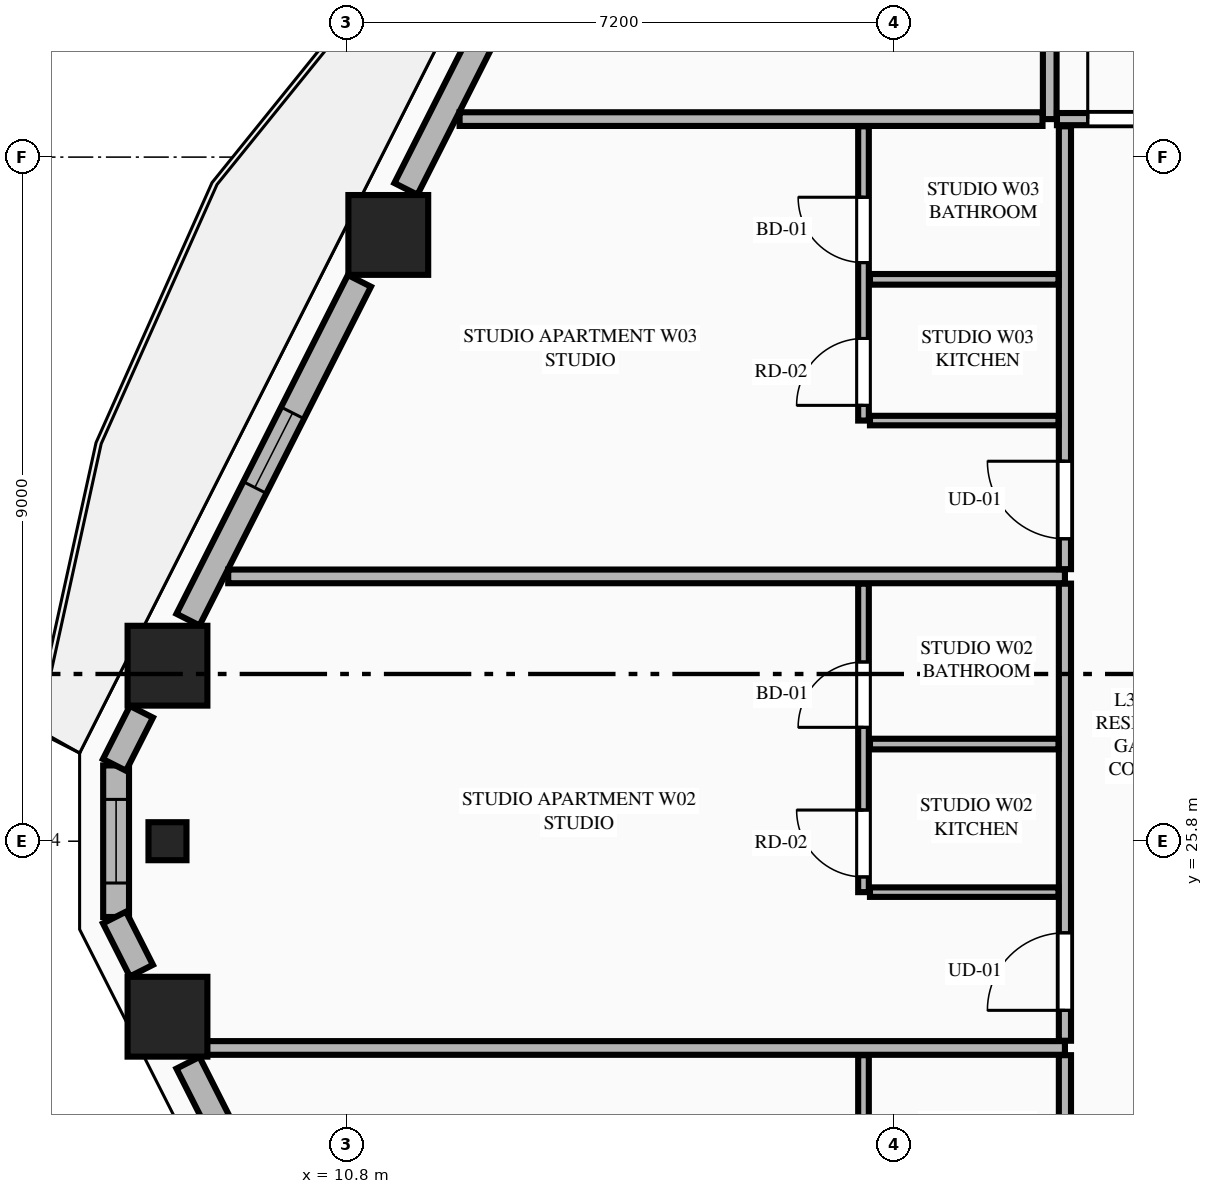
"""IFC4 building model, lengths in metres.
Left out: names, types, materials, properties, quantities, classifications, styles, units other than length and angle.
Written with IfcOpenShell. Run it as: python <this file> out.ifc"""

import sys

from ifc_helpers import new_model, si_unit, direction, frame, frame_2d, origin, origin_2d, place, context, subcontext, project, spatial, rectangle, extrude, element, fill, save


model = new_model("IFC4")
c1 = context("Model", 3, precision=1e-05, world=origin(), true_north=direction((0.0, 1.0)))
c2 = subcontext(c1, "Body", "Model", "MODEL_VIEW")
j1 = project(units=[si_unit("LENGTHUNIT", "METRE"), si_unit("PLANEANGLEUNIT", "RADIAN")], contexts=[c1])
p1 = place(None, origin())
s1 = spatial("IfcSite", under=j1, at=p1, CompositionType="ELEMENT")
p2 = place(p1, origin())
s2 = spatial("IfcBuilding", under=s1, at=p2, CompositionType="ELEMENT")
p3 = place(p2, frame((0.0, 0.0, 116.15)))
s3 = spatial("IfcBuildingStorey", under=s2, at=p3, CompositionType="ELEMENT", Elevation=116.15)
for number, where, z_axis, x_axis in (
    (1, (11.348, 33.776, 0.0), (0.0, 0.0, 1.0), (1.0, 0.0, 0.0)),
    (2, (8.443, 28.109, 0.0), (0.0, 0.0, 1.0), (1.0, 0.0, 0.0)),
    (3, (8.443, 23.491, 0.0), (0.0, 0.0, 1.0), (1.0, 0.0, 0.0)),
):
    element("IfcColumn", number, at=place(p3, frame(where, z_axis=z_axis, x_axis=x_axis)), inside=s3, PredefinedType="COLUMN", context=c2, shape_type="SweptSolid", body=[
        extrude(rectangle(XDim=1.05, YDim=1.05, at=origin_2d()), origin(), (0.0, 0.0, 1.0), 3.55),
    ])
p4 = place(p3, frame((8.443, 25.8, 0.0), z_axis=(0.0, 0.0, 1.0), x_axis=(0.0, -1.0, 0.0)))
e4 = element("IfcColumn", 4, at=p4, inside=s3, PredefinedType="PILASTER", context=c2, shape_type="SweptSolid", body=[
    extrude(rectangle(XDim=0.5, YDim=0.35, at=origin_2d()), origin(), (0.0, 0.0, 1.0), 3.55),
])
p5 = place(p3, frame((7.767, 26.797, 0.0), z_axis=(0.0, 0.0, 1.0), x_axis=(0.0, -1.0, 0.0)))
e5 = element("IfcWall", 5, at=p5, inside=s3, PredefinedType="STANDARD", context=c2, shape_type="SweptSolid", body=[
    extrude(rectangle(XDim=1.994, YDim=0.34, at=frame_2d((0.997, 0.0))), origin(), (0.0, 0.0, 1.0), 3.34),
])
p6 = place(p5, frame((0.447, 0.0, 0.75)))
e6 = element("IfcOpeningElement", 6, at=p6, cuts=e5, PredefinedType="OPENING", context=c2, shape_type="SweptSolid", body=[
    extrude(rectangle(XDim=1.1, YDim=2.0, at=frame_2d((0.55, 1.0))), frame((0.0, 0.18, 0.0), z_axis=(0.0, -1.0, 0.0), x_axis=(1.0, 0.0, 0.0)), (0.0, 0.0, 1.0), 0.36),
])
p7 = place(p3, frame((13.937, 39.039, 0.0), z_axis=(0.0, 0.0, 1.0), x_axis=(-0.451567731634, -0.892236842855, 0.0)))
e7 = element("IfcWall", 7, at=p7, inside=s3, PredefinedType="STANDARD", context=c2, shape_type="SweptSolid", body=[
    extrude(rectangle(XDim=5.219, YDim=0.34, at=frame_2d((2.61, 0.0))), origin(), (0.0, 0.0, 1.0), 2.797),
])
p8 = place(p7, frame((1.42, 0.0, 0.0)))
e8 = element("IfcOpeningElement", 8, at=p8, cuts=e7, PredefinedType="OPENING", context=c2, shape_type="SweptSolid", body=[
    extrude(rectangle(XDim=1.1, YDim=2.25, at=frame_2d((0.55, 1.125))), frame((0.0, 0.18, 0.0), z_axis=(0.0, -1.0, 0.0), x_axis=(1.0, 0.0, 0.0)), (0.0, 0.0, 1.0), 0.36),
])
p9 = place(p3, frame((10.968, 33.172, 0.0), z_axis=(0.0, 0.0, 1.0), x_axis=(-0.451470533039, -0.892286029139, 0.0)))
e9 = element("IfcWall", 9, at=p9, inside=s3, PredefinedType="STANDARD", context=c2, shape_type="SweptSolid", body=[
    extrude(rectangle(XDim=4.995, YDim=0.34, at=frame_2d((2.498, 0.0))), origin(), (0.0, 0.0, 1.0), 2.797),
])
p10 = place(p9, frame((1.947, 0.0, 0.75)))
e10 = element("IfcOpeningElement", 10, at=p10, cuts=e9, PredefinedType="OPENING", context=c2, shape_type="SweptSolid", body=[
    extrude(rectangle(XDim=1.1, YDim=1.897, at=frame_2d((0.55, 0.948))), frame((0.0, 0.18, 0.0), z_axis=(0.0, -1.0, 0.0), x_axis=(1.0, 0.0, 0.0)), (0.0, 0.0, 1.0), 0.36),
])
for number, where, z_axis, x_axis in (
    (11, (8.1, 27.503, 0.0), (0.0, 0.0, 1.0), (-0.452, -0.892, 0.0)),
    (12, (7.746, 24.796, 0.0), (0.0, 0.0, 1.0), (0.452, -0.892, 0.0)),
):
    element("IfcWall", number, at=place(p3, frame(where, z_axis=z_axis, x_axis=x_axis)), inside=s3, PredefinedType="STANDARD", context=c2, shape_type="SweptSolid", body=[
        extrude(rectangle(XDim=0.783, YDim=0.34, at=frame_2d((0.392, 0.0))), origin(), (0.0, 0.0, 1.0), 3.34),
    ])
p11 = place(p3, frame((8.713, 22.885, 0.0), z_axis=(0.0, 0.0, 1.0), x_axis=(0.451470533039, -0.892286029139, 0.0)))
e13 = element("IfcWall", 13, at=p11, inside=s3, PredefinedType="STANDARD", context=c2, shape_type="SweptSolid", body=[
    extrude(rectangle(XDim=4.995, YDim=0.34, at=frame_2d((2.498, 0.0))), origin(), (0.0, 0.0, 1.0), 2.797),
])
p12 = place(p11, frame((1.947, 0.0, 0.75)))
e14 = element("IfcOpeningElement", 14, at=p12, cuts=e13, PredefinedType="OPENING", context=c2, shape_type="SweptSolid", body=[
    extrude(rectangle(XDim=1.1, YDim=1.897, at=frame_2d((0.55, 0.948))), frame((0.0, 0.18, 0.0), z_axis=(0.0, -1.0, 0.0), x_axis=(1.0, 0.0, 0.0)), (0.0, 0.0, 1.0), 0.36),
])
p13 = place(p3, frame((20.05, 35.3, 0.0), z_axis=(0.0, 0.0, 1.0), x_axis=(0.0, 1.0, 0.0)))
e15 = element("IfcWall", 15, at=p13, inside=s3, PredefinedType="PARTITIONING", context=c2, shape_type="SweptSolid", body=[
    extrude(rectangle(XDim=12.195, YDim=0.18, at=frame_2d((6.098, 0.0))), origin(), (0.0, 0.0, 1.0), 3.34),
])
p14 = place(p3, frame((20.145, 35.3, 0.0), z_axis=(0.0, 0.0, 1.0), x_axis=(1.0, 0.0, 0.0)))
e16 = element("IfcWall", 16, at=p14, inside=s3, PredefinedType="PARTITIONING", context=c2, shape_type="SweptSolid", body=[
    extrude(rectangle(XDim=24.51, YDim=0.16, at=frame_2d((12.255, 0.0))), origin(), (0.0, 0.0, 1.0), 3.34),
])
p15 = place(p14, frame((0.405, 0.0, 0.0)))
e17 = element("IfcOpeningElement", 17, at=p15, cuts=e16, PredefinedType="OPENING", context=c2, shape_type="SweptSolid", body=[
    extrude(rectangle(XDim=1.35, YDim=2.35, at=frame_2d((0.675, 1.175))), frame((0.0, 0.09, 0.0), z_axis=(0.0, -1.0, 0.0), x_axis=(1.0, 0.0, 0.0)), (0.0, 0.0, 1.0), 0.18),
])
p16 = place(p3, frame((12.286, 35.3, 0.0), z_axis=(0.0, 0.0, 1.0), x_axis=(1.0, 0.0, 0.0)))
e18 = element("IfcWall", 18, at=p16, inside=s3, PredefinedType="PARTITIONING", context=c2, shape_type="SweptSolid", body=[
    extrude(rectangle(XDim=7.669, YDim=0.18, at=frame_2d((3.834, 0.0))), origin(), (0.0, 0.0, 1.0), 3.34),
])
p17 = place(p3, frame((20.25, 16.595, 0.0), z_axis=(0.0, 0.0, 1.0), x_axis=(0.0, 1.0, 0.0)))
e19 = element("IfcWall", 19, at=p17, inside=s3, PredefinedType="PARTITIONING", context=c2, shape_type="SweptSolid", body=[
    extrude(rectangle(XDim=6.39, YDim=0.16, at=frame_2d((3.195, 0.0))), origin(), (0.0, 0.0, 1.0), 3.34),
])
p18 = place(p17, frame((0.4, 0.0, 0.0)))
e20 = element("IfcOpeningElement", 20, at=p18, cuts=e19, PredefinedType="OPENING", context=c2, shape_type="SweptSolid", body=[
    extrude(rectangle(XDim=1.02, YDim=2.25, at=frame_2d((0.51, 1.125))), frame((0.0, 0.09, 0.0), z_axis=(0.0, -1.0, 0.0), x_axis=(1.0, 0.0, 0.0)), (0.0, 0.0, 1.0), 0.18),
])
p19 = place(p3, frame((17.6, 18.55, 0.0), z_axis=(0.0, 0.0, 1.0), x_axis=(0.0, 1.0, 0.0)))
e21 = element("IfcWall", 21, at=p19, inside=s3, PredefinedType="PLUMBINGWALL", context=c2, shape_type="SweptSolid", body=[
    extrude(rectangle(XDim=4.435, YDim=0.14, at=frame_2d((2.218, 0.0))), origin(), (0.0, 0.0, 1.0), 3.34),
])
p20 = place(p19, frame((2.349, 0.0, 0.0)))
e22 = element("IfcOpeningElement", 22, at=p20, cuts=e21, PredefinedType="OPENING", context=c2, shape_type="SweptSolid", body=[
    extrude(rectangle(XDim=0.86, YDim=2.1, at=frame_2d((0.43, 1.05))), frame((0.0, 0.08, 0.0), z_axis=(0.0, -1.0, 0.0), x_axis=(1.0, 0.0, 0.0)), (0.0, 0.0, 1.0), 0.16),
])
p21 = place(p19, frame((0.2, 0.0, 0.0)))
e23 = element("IfcOpeningElement", 23, at=p21, cuts=e21, PredefinedType="OPENING", context=c2, shape_type="SweptSolid", body=[
    extrude(rectangle(XDim=0.88, YDim=2.15, at=frame_2d((0.44, 1.075))), frame((0.0, 0.08, 0.0), z_axis=(0.0, -1.0, 0.0), x_axis=(1.0, 0.0, 0.0)), (0.0, 0.0, 1.0), 0.16),
])
p22 = place(p3, frame((8.856, 23.08, 0.0), z_axis=(0.0, 0.0, 1.0), x_axis=(1.0, 0.0, 0.0)))
e24 = element("IfcWall", 24, at=p22, inside=s3, PredefinedType="PARTITIONING", context=c2, shape_type="SweptSolid", body=[
    extrude(rectangle(XDim=11.394, YDim=0.18, at=frame_2d((5.697, 0.0))), origin(), (0.0, 0.0, 1.0), 3.34),
])
p23 = place(p3, frame((20.25, 23.175, 0.0), z_axis=(0.0, 0.0, 1.0), x_axis=(0.0, 1.0, 0.0)))
e25 = element("IfcWall", 25, at=p23, inside=s3, PredefinedType="PARTITIONING", context=c2, shape_type="SweptSolid", body=[
    extrude(rectangle(XDim=6.014, YDim=0.16, at=frame_2d((3.007, 0.0))), origin(), (0.0, 0.0, 1.0), 3.34),
])
p24 = place(p23, frame((0.4, 0.0, 0.0)))
e26 = element("IfcOpeningElement", 26, at=p24, cuts=e25, PredefinedType="OPENING", context=c2, shape_type="SweptSolid", body=[
    extrude(rectangle(XDim=1.02, YDim=2.25, at=frame_2d((0.51, 1.125))), frame((0.0, 0.09, 0.0), z_axis=(0.0, -1.0, 0.0), x_axis=(1.0, 0.0, 0.0)), (0.0, 0.0, 1.0), 0.18),
])
p25 = place(p3, frame((17.685, 25.13, 0.0), z_axis=(0.0, 0.0, 1.0), x_axis=(1.0, 0.0, 0.0)))
e27 = element("IfcWall", 27, at=p25, inside=s3, PredefinedType="PARTITIONING", context=c2, shape_type="SweptSolid", body=[
    extrude(rectangle(XDim=2.48, YDim=0.125, at=frame_2d((1.24, 0.0))), origin(), (0.0, 0.0, 1.0), 3.34),
])
p26 = place(p3, frame((17.6, 25.13, 0.0), z_axis=(0.0, 0.0, 1.0), x_axis=(0.0, 1.0, 0.0)))
e28 = element("IfcWall", 28, at=p26, inside=s3, PredefinedType="PLUMBINGWALL", context=c2, shape_type="SweptSolid", body=[
    extrude(rectangle(XDim=4.059, YDim=0.14, at=frame_2d((2.03, 0.0))), origin(), (0.0, 0.0, 1.0), 3.34),
])
p27 = place(p26, frame((2.168, 0.0, 0.0)))
e29 = element("IfcOpeningElement", 29, at=p27, cuts=e28, PredefinedType="OPENING", context=c2, shape_type="SweptSolid", body=[
    extrude(rectangle(XDim=0.86, YDim=2.1, at=frame_2d((0.43, 1.05))), frame((0.0, 0.08, 0.0), z_axis=(0.0, -1.0, 0.0), x_axis=(1.0, 0.0, 0.0)), (0.0, 0.0, 1.0), 0.16),
])
p28 = place(p26, frame((0.2, 0.0, 0.0)))
e30 = element("IfcOpeningElement", 30, at=p28, cuts=e28, PredefinedType="OPENING", context=c2, shape_type="SweptSolid", body=[
    extrude(rectangle(XDim=0.88, YDim=2.15, at=frame_2d((0.44, 1.075))), frame((0.0, 0.08, 0.0), z_axis=(0.0, -1.0, 0.0), x_axis=(1.0, 0.0, 0.0)), (0.0, 0.0, 1.0), 0.16),
])
p29 = place(p3, frame((17.685, 27.078, 0.0), z_axis=(0.0, 0.0, 1.0), x_axis=(1.0, 0.0, 0.0)))
e31 = element("IfcWall", 31, at=p29, inside=s3, PredefinedType="PLUMBINGWALL", context=c2, shape_type="SweptSolid", body=[
    extrude(rectangle(XDim=2.48, YDim=0.14, at=frame_2d((1.24, 0.0))), origin(), (0.0, 0.0, 1.0), 3.34),
])
p30 = place(p3, frame((9.242, 29.284, 0.0), z_axis=(0.0, 0.0, 1.0), x_axis=(1.0, 0.0, 0.0)))
e32 = element("IfcWall", 32, at=p30, inside=s3, PredefinedType="PARTITIONING", context=c2, shape_type="SweptSolid", body=[
    extrude(rectangle(XDim=11.008, YDim=0.18, at=frame_2d((5.504, 0.0))), origin(), (0.0, 0.0, 1.0), 3.34),
])
p31 = place(p3, frame((20.25, 29.379, 0.0), z_axis=(0.0, 0.0, 1.0), x_axis=(0.0, 1.0, 0.0)))
e33 = element("IfcWall", 33, at=p31, inside=s3, PredefinedType="PARTITIONING", context=c2, shape_type="SweptSolid", body=[
    extrude(rectangle(XDim=5.826, YDim=0.16, at=frame_2d((2.913, 0.0))), origin(), (0.0, 0.0, 1.0), 3.34),
])
p32 = place(p31, frame((0.4, 0.0, 0.0)))
e34 = element("IfcOpeningElement", 34, at=p32, cuts=e33, PredefinedType="OPENING", context=c2, shape_type="SweptSolid", body=[
    extrude(rectangle(XDim=1.02, YDim=2.25, at=frame_2d((0.51, 1.125))), frame((0.0, 0.09, 0.0), z_axis=(0.0, -1.0, 0.0), x_axis=(1.0, 0.0, 0.0)), (0.0, 0.0, 1.0), 0.18),
])
p33 = place(p3, frame((17.685, 31.334, 0.0), z_axis=(0.0, 0.0, 1.0), x_axis=(1.0, 0.0, 0.0)))
e35 = element("IfcWall", 35, at=p33, inside=s3, PredefinedType="PARTITIONING", context=c2, shape_type="SweptSolid", body=[
    extrude(rectangle(XDim=2.48, YDim=0.125, at=frame_2d((1.24, 0.0))), origin(), (0.0, 0.0, 1.0), 3.34),
])
p34 = place(p3, frame((17.6, 31.334, 0.0), z_axis=(0.0, 0.0, 1.0), x_axis=(0.0, 1.0, 0.0)))
e36 = element("IfcWall", 36, at=p34, inside=s3, PredefinedType="PLUMBINGWALL", context=c2, shape_type="SweptSolid", body=[
    extrude(rectangle(XDim=3.871, YDim=0.14, at=frame_2d((1.936, 0.0))), origin(), (0.0, 0.0, 1.0), 3.34),
])
p35 = place(p34, frame((2.078, 0.0, 0.0)))
e37 = element("IfcOpeningElement", 37, at=p35, cuts=e36, PredefinedType="OPENING", context=c2, shape_type="SweptSolid", body=[
    extrude(rectangle(XDim=0.86, YDim=2.1, at=frame_2d((0.43, 1.05))), frame((0.0, 0.08, 0.0), z_axis=(0.0, -1.0, 0.0), x_axis=(1.0, 0.0, 0.0)), (0.0, 0.0, 1.0), 0.16),
])
p36 = place(p34, frame((0.2, 0.0, 0.0)))
e38 = element("IfcOpeningElement", 38, at=p36, cuts=e36, PredefinedType="OPENING", context=c2, shape_type="SweptSolid", body=[
    extrude(rectangle(XDim=0.88, YDim=2.15, at=frame_2d((0.44, 1.075))), frame((0.0, 0.08, 0.0), z_axis=(0.0, -1.0, 0.0), x_axis=(1.0, 0.0, 0.0)), (0.0, 0.0, 1.0), 0.16),
])
p37 = place(p3, frame((17.685, 33.192, 0.0), z_axis=(0.0, 0.0, 1.0), x_axis=(1.0, 0.0, 0.0)))
e39 = element("IfcWall", 39, at=p37, inside=s3, PredefinedType="PLUMBINGWALL", context=c2, shape_type="SweptSolid", body=[
    extrude(rectangle(XDim=2.48, YDim=0.14, at=frame_2d((1.24, 0.0))), origin(), (0.0, 0.0, 1.0), 2.722),
])
p38 = place(p10, origin())
e40 = element("IfcWindow", 40, at=p38, inside=s3, PartitioningType="SINGLE_PANEL", PredefinedType="WINDOW", context=c2, shape_type="SweptSolid", body=[
    extrude(rectangle(XDim=1.1, YDim=1.897, at=frame_2d((0.55, 0.948))), frame((0.0, 0.03, 0.0), z_axis=(0.0, -1.0, 0.0), x_axis=(1.0, 0.0, 0.0)), (0.0, 0.0, 1.0), 0.06),
])
fill(e10, e40)
p39 = place(p15, origin())
e41 = element("IfcDoor", 41, at=p39, inside=s3, OperationType="SINGLE_SWING_LEFT", PredefinedType="DOOR", context=c2, shape_type="SweptSolid", body=[
    extrude(rectangle(XDim=1.35, YDim=2.35, at=frame_2d((0.675, 1.175))), frame((0.0, 0.025, 0.0), z_axis=(0.0, -1.0, 0.0), x_axis=(1.0, 0.0, 0.0)), (0.0, 0.0, 1.0), 0.05),
])
fill(e17, e41)
p40 = place(p27, origin())
e42 = element("IfcDoor", 42, at=p40, inside=s3, OperationType="SINGLE_SWING_LEFT", PredefinedType="DOOR", context=c2, shape_type="SweptSolid", body=[
    extrude(rectangle(XDim=0.86, YDim=2.1, at=frame_2d((0.43, 1.05))), frame((0.0, 0.025, 0.0), z_axis=(0.0, -1.0, 0.0), x_axis=(1.0, 0.0, 0.0)), (0.0, 0.0, 1.0), 0.05),
])
fill(e29, e42)
p41 = place(p24, origin())
e43 = element("IfcDoor", 43, at=p41, inside=s3, OperationType="SINGLE_SWING_LEFT", PredefinedType="DOOR", context=c2, shape_type="SweptSolid", body=[
    extrude(rectangle(XDim=1.02, YDim=2.25, at=frame_2d((0.51, 1.125))), frame((0.0, 0.025, 0.0), z_axis=(0.0, -1.0, 0.0), x_axis=(1.0, 0.0, 0.0)), (0.0, 0.0, 1.0), 0.05),
])
fill(e26, e43)
p42 = place(p28, origin())
e44 = element("IfcDoor", 44, at=p42, inside=s3, OperationType="SINGLE_SWING_RIGHT", PredefinedType="DOOR", context=c2, shape_type="SweptSolid", body=[
    extrude(rectangle(XDim=0.88, YDim=2.15, at=frame_2d((0.44, 1.075))), frame((0.0, 0.025, 0.0), z_axis=(0.0, -1.0, 0.0), x_axis=(1.0, 0.0, 0.0)), (0.0, 0.0, 1.0), 0.05),
])
fill(e30, e44)
p43 = place(p35, origin())
e45 = element("IfcDoor", 45, at=p43, inside=s3, OperationType="SINGLE_SWING_RIGHT", PredefinedType="DOOR", context=c2, shape_type="SweptSolid", body=[
    extrude(rectangle(XDim=0.86, YDim=2.1, at=frame_2d((0.43, 1.05))), frame((0.0, 0.025, 0.0), z_axis=(0.0, -1.0, 0.0), x_axis=(1.0, 0.0, 0.0)), (0.0, 0.0, 1.0), 0.05),
])
fill(e37, e45)
p44 = place(p32, origin())
e46 = element("IfcDoor", 46, at=p44, inside=s3, OperationType="SINGLE_SWING_RIGHT", PredefinedType="DOOR", context=c2, shape_type="SweptSolid", body=[
    extrude(rectangle(XDim=1.02, YDim=2.25, at=frame_2d((0.51, 1.125))), frame((0.0, 0.025, 0.0), z_axis=(0.0, -1.0, 0.0), x_axis=(1.0, 0.0, 0.0)), (0.0, 0.0, 1.0), 0.05),
])
fill(e34, e46)
p45 = place(p36, origin())
e47 = element("IfcDoor", 47, at=p45, inside=s3, OperationType="SINGLE_SWING_LEFT", PredefinedType="DOOR", context=c2, shape_type="SweptSolid", body=[
    extrude(rectangle(XDim=0.88, YDim=2.15, at=frame_2d((0.44, 1.075))), frame((0.0, 0.025, 0.0), z_axis=(0.0, -1.0, 0.0), x_axis=(1.0, 0.0, 0.0)), (0.0, 0.0, 1.0), 0.05),
])
fill(e38, e47)
p46 = place(p6, origin())
e48 = element("IfcWindow", 48, at=p46, inside=s3, PartitioningType="SINGLE_PANEL", PredefinedType="WINDOW", context=c2, shape_type="SweptSolid", body=[
    extrude(rectangle(XDim=1.1, YDim=2.0, at=frame_2d((0.55, 1.0))), frame((0.0, 0.03, 0.0), z_axis=(0.0, -1.0, 0.0), x_axis=(1.0, 0.0, 0.0)), (0.0, 0.0, 1.0), 0.06),
])
fill(e6, e48)
save(model, sys.argv[1])
